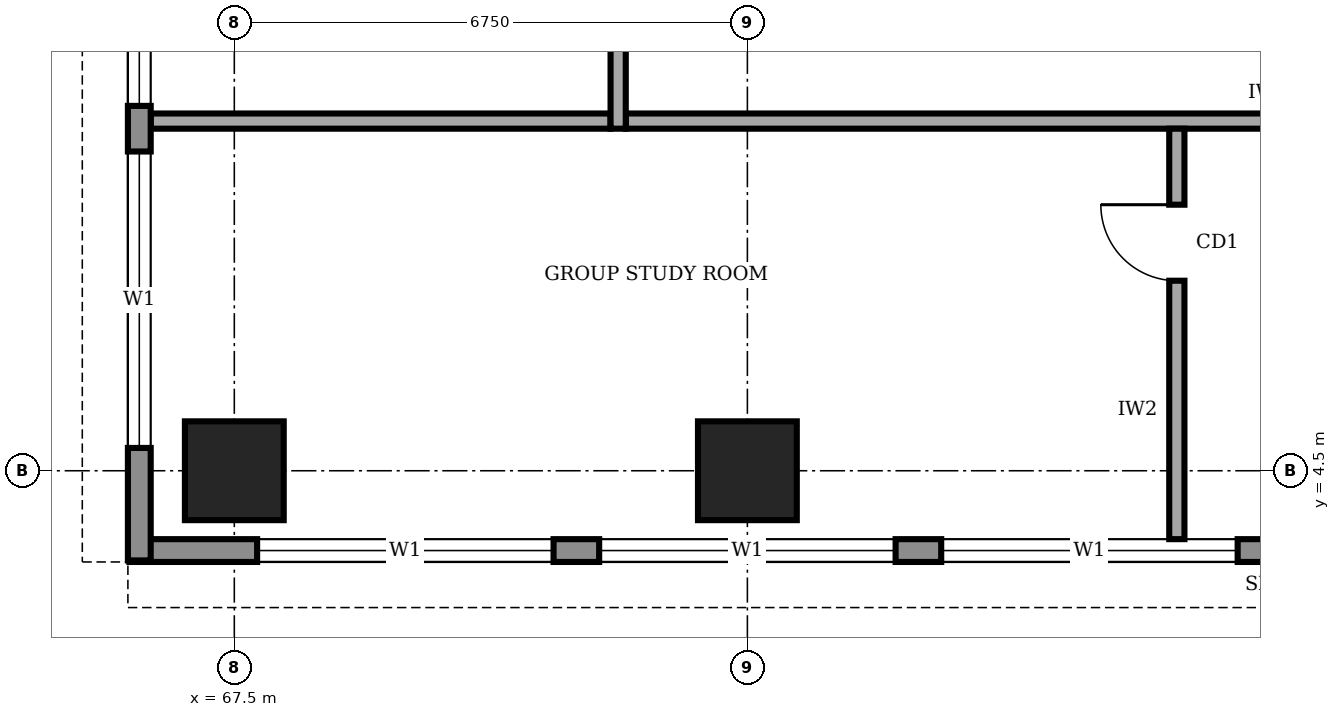
"""IFC4 building model, lengths in metres.
Left out: names, types, materials, properties, quantities, classifications, styles, units other than length and angle.
Written with IfcOpenShell. Run it as: python <this file> out.ifc"""

import sys

from ifc_helpers import new_model, si_unit, direction, frame, frame_2d, origin, origin_2d, place, context, subcontext, project, spatial, rectangle, extrude, element, fill, save


model = new_model("IFC4")
c1 = context("Model", 3, precision=1e-05, world=origin(), true_north=direction((0.0, 1.0)))
c2 = subcontext(c1, "Body", "Model", "MODEL_VIEW")
j1 = project(units=[si_unit("LENGTHUNIT", "METRE"), si_unit("PLANEANGLEUNIT", "RADIAN")], contexts=[c1])
p1 = place(None, origin())
s1 = spatial("IfcSite", under=j1, at=p1, CompositionType="ELEMENT")
p2 = place(p1, origin())
s2 = spatial("IfcBuilding", under=s1, at=p2, CompositionType="ELEMENT")
p3 = place(p2, frame((0.0, 0.0, 217.0)))
s3 = spatial("IfcBuildingStorey", under=s2, at=p3, CompositionType="ELEMENT", Elevation=217.0)
for number, where, z_axis, x_axis in (
    (1, (67.5, 4.5, 0.0), (0.0, 0.0, 1.0), (1.0, 0.0, 0.0)),
    (2, (74.25, 4.5, 0.0), (0.0, 0.0, 1.0), (1.0, 0.0, 0.0)),
):
    element("IfcColumn", number, at=place(p3, frame(where, z_axis=z_axis, x_axis=x_axis)), inside=s3, PredefinedType="COLUMN", context=c2, shape_type="SweptSolid", body=[
        extrude(rectangle(XDim=1.3, YDim=1.3, at=origin_2d()), origin(), (0.0, 0.0, 1.0), 4.0),
    ])
p4 = place(p3, frame((66.12, 3.45, 0.0), z_axis=(0.0, 0.0, 1.0), x_axis=(1.0, 0.0, 0.0)))
e3 = element("IfcWall", 3, at=p4, inside=s3, PredefinedType="STANDARD", context=c2, shape_type="SweptSolid", body=[
    extrude(rectangle(XDim=29.91, YDim=0.3, at=frame_2d((14.955, 0.0))), origin(), (0.0, 0.0, 1.0), 3.75),
])
p5 = place(p4, frame((1.68, 0.0, 0.9)))
e4 = element("IfcOpeningElement", 4, at=p5, cuts=e3, PredefinedType="OPENING", context=c2, shape_type="SweptSolid", body=[
    extrude(rectangle(XDim=3.9, YDim=2.2, at=frame_2d((1.95, 1.1))), frame((0.0, 0.16, 0.0), z_axis=(0.0, -1.0, 0.0), x_axis=(1.0, 0.0, 0.0)), (0.0, 0.0, 1.0), 0.32),
])
p6 = place(p4, frame((6.18, 0.0, 0.9)))
e5 = element("IfcOpeningElement", 5, at=p6, cuts=e3, PredefinedType="OPENING", context=c2, shape_type="SweptSolid", body=[
    extrude(rectangle(XDim=3.9, YDim=2.2, at=frame_2d((1.95, 1.1))), frame((0.0, 0.16, 0.0), z_axis=(0.0, -1.0, 0.0), x_axis=(1.0, 0.0, 0.0)), (0.0, 0.0, 1.0), 0.32),
])
p7 = place(p4, frame((10.68, 0.0, 0.9)))
e6 = element("IfcOpeningElement", 6, at=p7, cuts=e3, PredefinedType="OPENING", context=c2, shape_type="SweptSolid", body=[
    extrude(rectangle(XDim=3.9, YDim=2.2, at=frame_2d((1.95, 1.1))), frame((0.0, 0.16, 0.0), z_axis=(0.0, -1.0, 0.0), x_axis=(1.0, 0.0, 0.0)), (0.0, 0.0, 1.0), 0.32),
])
p8 = place(p4, frame((15.18, 0.0, 0.9)))
e7 = element("IfcOpeningElement", 7, at=p8, cuts=e3, PredefinedType="OPENING", context=c2, shape_type="SweptSolid", body=[
    extrude(rectangle(XDim=3.9, YDim=2.2, at=frame_2d((1.95, 1.1))), frame((0.0, 0.16, 0.0), z_axis=(0.0, -1.0, 0.0), x_axis=(1.0, 0.0, 0.0)), (0.0, 0.0, 1.0), 0.32),
])
p9 = place(p4, frame((19.68, 0.0, 0.9)))
e8 = element("IfcOpeningElement", 8, at=p9, cuts=e3, PredefinedType="OPENING", context=c2, shape_type="SweptSolid", body=[
    extrude(rectangle(XDim=3.9, YDim=2.2, at=frame_2d((1.95, 1.1))), frame((0.0, 0.16, 0.0), z_axis=(0.0, -1.0, 0.0), x_axis=(1.0, 0.0, 0.0)), (0.0, 0.0, 1.0), 0.32),
])
p10 = place(p4, frame((24.18, 0.0, 0.9)))
e9 = element("IfcOpeningElement", 9, at=p10, cuts=e3, PredefinedType="OPENING", context=c2, shape_type="SweptSolid", body=[
    extrude(rectangle(XDim=3.9, YDim=2.2, at=frame_2d((1.95, 1.1))), frame((0.0, 0.16, 0.0), z_axis=(0.0, -1.0, 0.0), x_axis=(1.0, 0.0, 0.0)), (0.0, 0.0, 1.0), 0.32),
])
p11 = place(p3, frame((66.25, 37.18, 0.0), z_axis=(0.0, 0.0, 1.0), x_axis=(0.0, -1.0, 0.0)))
e10 = element("IfcWall", 10, at=p11, inside=s3, PredefinedType="STANDARD", context=c2, shape_type="SweptSolid", body=[
    extrude(rectangle(XDim=33.86, YDim=0.3, at=frame_2d((16.93, 0.0))), origin(), (0.0, 0.0, 1.0), 3.75),
])
p12 = place(p11, frame((28.48, 0.0, 0.9)))
e11 = element("IfcOpeningElement", 11, at=p12, cuts=e10, PredefinedType="OPENING", context=c2, shape_type="SweptSolid", body=[
    extrude(rectangle(XDim=3.9, YDim=2.2, at=frame_2d((1.95, 1.1))), frame((0.0, 0.16, 0.0), z_axis=(0.0, -1.0, 0.0), x_axis=(1.0, 0.0, 0.0)), (0.0, 0.0, 1.0), 0.32),
])
p13 = place(p11, frame((23.98, 0.0, 0.9)))
e12 = element("IfcOpeningElement", 12, at=p13, cuts=e10, PredefinedType="OPENING", context=c2, shape_type="SweptSolid", body=[
    extrude(rectangle(XDim=3.9, YDim=2.2, at=frame_2d((1.95, 1.1))), frame((0.0, 0.16, 0.0), z_axis=(0.0, -1.0, 0.0), x_axis=(1.0, 0.0, 0.0)), (0.0, 0.0, 1.0), 0.32),
])
p14 = place(p11, frame((19.48, 0.0, 0.9)))
e13 = element("IfcOpeningElement", 13, at=p14, cuts=e10, PredefinedType="OPENING", context=c2, shape_type="SweptSolid", body=[
    extrude(rectangle(XDim=3.9, YDim=2.2, at=frame_2d((1.95, 1.1))), frame((0.0, 0.16, 0.0), z_axis=(0.0, -1.0, 0.0), x_axis=(1.0, 0.0, 0.0)), (0.0, 0.0, 1.0), 0.32),
])
p15 = place(p11, frame((14.98, 0.0, 0.9)))
e14 = element("IfcOpeningElement", 14, at=p15, cuts=e10, PredefinedType="OPENING", context=c2, shape_type="SweptSolid", body=[
    extrude(rectangle(XDim=3.9, YDim=2.2, at=frame_2d((1.95, 1.1))), frame((0.0, 0.16, 0.0), z_axis=(0.0, -1.0, 0.0), x_axis=(1.0, 0.0, 0.0)), (0.0, 0.0, 1.0), 0.32),
])
p16 = place(p11, frame((10.48, 0.0, 0.9)))
e15 = element("IfcOpeningElement", 15, at=p16, cuts=e10, PredefinedType="OPENING", context=c2, shape_type="SweptSolid", body=[
    extrude(rectangle(XDim=3.9, YDim=2.2, at=frame_2d((1.95, 1.1))), frame((0.0, 0.16, 0.0), z_axis=(0.0, -1.0, 0.0), x_axis=(1.0, 0.0, 0.0)), (0.0, 0.0, 1.0), 0.32),
])
p17 = place(p11, frame((5.98, 0.0, 0.9)))
e16 = element("IfcOpeningElement", 16, at=p17, cuts=e10, PredefinedType="OPENING", context=c2, shape_type="SweptSolid", body=[
    extrude(rectangle(XDim=3.9, YDim=2.2, at=frame_2d((1.95, 1.1))), frame((0.0, 0.16, 0.0), z_axis=(0.0, -1.0, 0.0), x_axis=(1.0, 0.0, 0.0)), (0.0, 0.0, 1.0), 0.32),
])
p18 = place(p11, frame((1.48, 0.0, 0.9)))
e17 = element("IfcOpeningElement", 17, at=p18, cuts=e10, PredefinedType="OPENING", context=c2, shape_type="SweptSolid", body=[
    extrude(rectangle(XDim=3.9, YDim=2.2, at=frame_2d((1.95, 1.1))), frame((0.0, 0.16, 0.0), z_axis=(0.0, -1.0, 0.0), x_axis=(1.0, 0.0, 0.0)), (0.0, 0.0, 1.0), 0.32),
])
p19 = place(p3, frame((72.65, 9.1, 0.0), z_axis=(0.0, 0.0, 1.0), x_axis=(1.0, 0.0, 0.0)))
e18 = element("IfcWall", 18, at=p19, inside=s3, PredefinedType="SOLIDWALL", context=c2, shape_type="SweptSolid", body=[
    extrude(rectangle(XDim=16.9, YDim=0.2, at=frame_2d((8.45, 0.0))), origin(), (0.0, 0.0, 1.0), 3.75),
])
p20 = place(p3, frame((72.55, 32.8, 0.0), z_axis=(0.0, 0.0, 1.0), x_axis=(0.0, -1.0, 0.0)))
e19 = element("IfcWall", 19, at=p20, inside=s3, PredefinedType="SOLIDWALL", context=c2, shape_type="SweptSolid", body=[
    extrude(rectangle(XDim=23.8, YDim=0.2, at=frame_2d((11.9, 0.0))), origin(), (0.0, 0.0, 1.0), 3.75),
])
p21 = place(p20, frame((21.05, 0.0, 0.0)))
e20 = element("IfcOpeningElement", 20, at=p21, cuts=e19, PredefinedType="OPENING", context=c2, shape_type="SweptSolid", body=[
    extrude(rectangle(XDim=1.0, YDim=2.1, at=frame_2d((0.5, 1.05))), frame((0.0, 0.11, 0.0), z_axis=(0.0, -1.0, 0.0), x_axis=(1.0, 0.0, 0.0)), (0.0, 0.0, 1.0), 0.22),
])
p22 = place(p20, frame((14.3, 0.0, 0.0)))
e21 = element("IfcOpeningElement", 21, at=p22, cuts=e19, PredefinedType="OPENING", context=c2, shape_type="SweptSolid", body=[
    extrude(rectangle(XDim=1.0, YDim=2.1, at=frame_2d((0.5, 1.05))), frame((0.0, 0.11, 0.0), z_axis=(0.0, -1.0, 0.0), x_axis=(1.0, 0.0, 0.0)), (0.0, 0.0, 1.0), 0.22),
])
p23 = place(p20, frame((7.55, 0.0, 0.0)))
e22 = element("IfcOpeningElement", 22, at=p23, cuts=e19, PredefinedType="OPENING", context=c2, shape_type="SweptSolid", body=[
    extrude(rectangle(XDim=1.0, YDim=2.1, at=frame_2d((0.5, 1.05))), frame((0.0, 0.11, 0.0), z_axis=(0.0, -1.0, 0.0), x_axis=(1.0, 0.0, 0.0)), (0.0, 0.0, 1.0), 0.22),
])
p24 = place(p20, frame((2.3, 0.0, 0.0)))
e23 = element("IfcOpeningElement", 23, at=p24, cuts=e19, PredefinedType="OPENING", context=c2, shape_type="SweptSolid", body=[
    extrude(rectangle(XDim=1.0, YDim=2.1, at=frame_2d((0.5, 1.05))), frame((0.0, 0.11, 0.0), z_axis=(0.0, -1.0, 0.0), x_axis=(1.0, 0.0, 0.0)), (0.0, 0.0, 1.0), 0.22),
])
p25 = place(p3, frame((79.9, 3.6, 0.0), z_axis=(0.0, 0.0, 1.0), x_axis=(0.0, 1.0, 0.0)))
e24 = element("IfcWall", 24, at=p25, inside=s3, PredefinedType="SOLIDWALL", context=c2, shape_type="SweptSolid", body=[
    extrude(rectangle(XDim=5.4, YDim=0.2, at=frame_2d((2.7, 0.0))), origin(), (0.0, 0.0, 1.0), 3.75),
])
p26 = place(p25, frame((3.4, 0.0, 0.0)))
e25 = element("IfcOpeningElement", 25, at=p26, cuts=e24, PredefinedType="OPENING", context=c2, shape_type="SweptSolid", body=[
    extrude(rectangle(XDim=1.0, YDim=2.1, at=frame_2d((0.5, 1.05))), frame((0.0, 0.11, 0.0), z_axis=(0.0, -1.0, 0.0), x_axis=(1.0, 0.0, 0.0)), (0.0, 0.0, 1.0), 0.22),
])
p27 = place(p3, frame((66.4, 9.1, 0.0), z_axis=(0.0, 0.0, 1.0), x_axis=(1.0, 0.0, 0.0)))
e26 = element("IfcWall", 26, at=p27, inside=s3, PredefinedType="SOLIDWALL", context=c2, shape_type="SweptSolid", body=[
    extrude(rectangle(XDim=6.05, YDim=0.2, at=frame_2d((3.025, 0.0))), origin(), (0.0, 0.0, 1.0), 3.75),
])
p28 = place(p5, origin())
e27 = element("IfcWindow", 27, at=p28, inside=s3, PartitioningType="SINGLE_PANEL", PredefinedType="WINDOW", context=c2, shape_type="SweptSolid", body=[
    extrude(rectangle(XDim=3.9, YDim=2.2, at=frame_2d((1.95, 1.1))), frame((0.0, 0.03, 0.0), z_axis=(0.0, -1.0, 0.0), x_axis=(1.0, 0.0, 0.0)), (0.0, 0.0, 1.0), 0.06),
])
fill(e4, e27)
p29 = place(p6, origin())
e28 = element("IfcWindow", 28, at=p29, inside=s3, PartitioningType="SINGLE_PANEL", PredefinedType="WINDOW", context=c2, shape_type="SweptSolid", body=[
    extrude(rectangle(XDim=3.9, YDim=2.2, at=frame_2d((1.95, 1.1))), frame((0.0, 0.03, 0.0), z_axis=(0.0, -1.0, 0.0), x_axis=(1.0, 0.0, 0.0)), (0.0, 0.0, 1.0), 0.06),
])
fill(e5, e28)
p30 = place(p7, origin())
e29 = element("IfcWindow", 29, at=p30, inside=s3, PartitioningType="SINGLE_PANEL", PredefinedType="WINDOW", context=c2, shape_type="SweptSolid", body=[
    extrude(rectangle(XDim=3.9, YDim=2.2, at=frame_2d((1.95, 1.1))), frame((0.0, 0.03, 0.0), z_axis=(0.0, -1.0, 0.0), x_axis=(1.0, 0.0, 0.0)), (0.0, 0.0, 1.0), 0.06),
])
fill(e6, e29)
p31 = place(p12, origin())
e30 = element("IfcWindow", 30, at=p31, inside=s3, PartitioningType="SINGLE_PANEL", PredefinedType="WINDOW", context=c2, shape_type="SweptSolid", body=[
    extrude(rectangle(XDim=3.9, YDim=2.2, at=frame_2d((1.95, 1.1))), frame((0.0, 0.03, 0.0), z_axis=(0.0, -1.0, 0.0), x_axis=(1.0, 0.0, 0.0)), (0.0, 0.0, 1.0), 0.06),
])
fill(e11, e30)
p32 = place(p13, origin())
e31 = element("IfcWindow", 31, at=p32, inside=s3, PartitioningType="SINGLE_PANEL", PredefinedType="WINDOW", context=c2, shape_type="SweptSolid", body=[
    extrude(rectangle(XDim=3.9, YDim=2.2, at=frame_2d((1.95, 1.1))), frame((0.0, 0.03, 0.0), z_axis=(0.0, -1.0, 0.0), x_axis=(1.0, 0.0, 0.0)), (0.0, 0.0, 1.0), 0.06),
])
fill(e12, e31)
p33 = place(p26, origin())
e32 = element("IfcDoor", 32, at=p33, inside=s3, OperationType="SINGLE_SWING_RIGHT", PredefinedType="DOOR", context=c2, shape_type="SweptSolid", body=[
    extrude(rectangle(XDim=1.0, YDim=2.1, at=frame_2d((0.5, 1.05))), frame((0.0, 0.025, 0.0), z_axis=(0.0, -1.0, 0.0), x_axis=(1.0, 0.0, 0.0)), (0.0, 0.0, 1.0), 0.05),
])
fill(e25, e32)
save(model, sys.argv[1])
